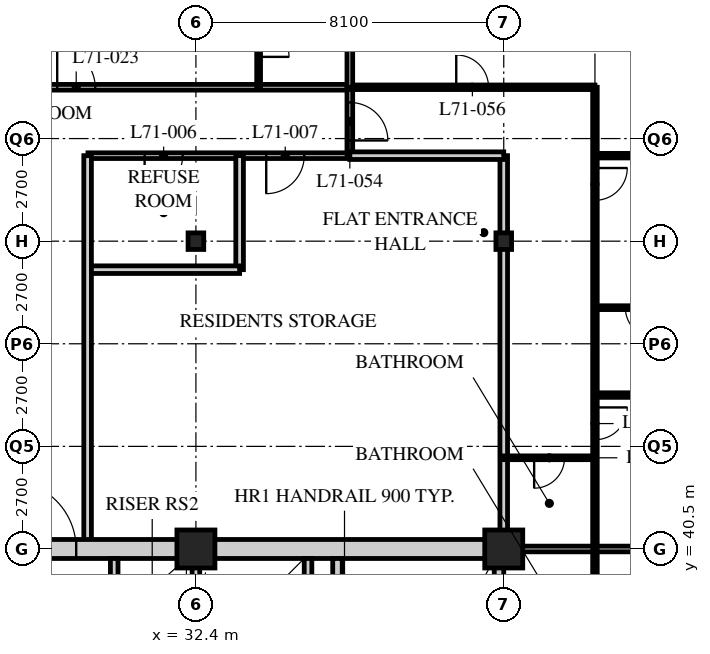
"""IFC4 building model, lengths in metres.
Left out: names, types, materials, properties, quantities, classifications, styles, units other than length and angle.
Written with IfcOpenShell. Run it as: python <this file> out.ifc"""

import sys

from ifc_helpers import new_model, si_unit, direction, frame, frame_2d, origin, origin_2d, place, context, subcontext, project, spatial, rectangle, hollow_rectangle, i_section, extrude, element, fill, save


model = new_model("IFC4")
c1 = context("Model", 3, precision=1e-05, world=origin(), true_north=direction((0.0, 1.0)))
c2 = subcontext(c1, "Body", "Model", "MODEL_VIEW")
j1 = project(units=[si_unit("LENGTHUNIT", "METRE"), si_unit("PLANEANGLEUNIT", "RADIAN")], contexts=[c1])
p1 = place(None, origin())
s1 = spatial("IfcSite", under=j1, at=p1, CompositionType="ELEMENT")
p2 = place(p1, origin())
s2 = spatial("IfcBuilding", under=s1, at=p2, CompositionType="ELEMENT")
p3 = place(p2, frame((0.0, 0.0, 277.5)))
s3 = spatial("IfcBuildingStorey", under=s2, at=p3, CompositionType="ELEMENT", Elevation=277.5)
p4 = place(p3, frame((32.4, 40.5, 0.0), z_axis=(0.0, 0.0, 1.0), x_axis=(1.0, 0.0, 0.0)))
e1 = element("IfcColumn", 1, at=p4, inside=s3, PredefinedType="COLUMN", context=c2, shape_type="SweptSolid", body=[
    extrude(hollow_rectangle(XDim=1.0, YDim=1.0, WallThickness=0.1, at=origin_2d()), origin(), (0.0, 0.0, 1.0), 3.9),
])
p5 = place(p3, frame((32.4, 48.6, 0.0), z_axis=(0.0, 0.0, 1.0), x_axis=(1.0, 0.0, 0.0)))
e2 = element("IfcColumn", 2, at=p5, inside=s3, PredefinedType="COLUMN", context=c2, shape_type="SweptSolid", body=[
    extrude(i_section(OverallWidth=0.412, OverallDepth=0.437, WebThickness=0.036, FlangeThickness=0.058, FilletRadius=0.015, at=origin_2d()), origin(), (0.0, 0.0, 1.0), 3.9),
])
p6 = place(p3, frame((40.5, 40.5, 0.0), z_axis=(0.0, 0.0, 1.0), x_axis=(1.0, 0.0, 0.0)))
e3 = element("IfcColumn", 3, at=p6, inside=s3, PredefinedType="COLUMN", context=c2, shape_type="SweptSolid", body=[
    extrude(hollow_rectangle(XDim=1.0, YDim=1.0, WallThickness=0.1, at=origin_2d()), origin(), (0.0, 0.0, 1.0), 3.9),
])
p7 = place(p3, frame((40.5, 48.6, 0.0), z_axis=(0.0, 0.0, 1.0), x_axis=(1.0, 0.0, 0.0)))
e4 = element("IfcColumn", 4, at=p7, inside=s3, PredefinedType="COLUMN", context=c2, shape_type="SweptSolid", body=[
    extrude(i_section(OverallWidth=0.412, OverallDepth=0.437, WebThickness=0.036, FlangeThickness=0.058, FilletRadius=0.015, at=origin_2d()), origin(), (0.0, 0.0, 1.0), 3.9),
])
p8 = place(p3, frame((12.15, 52.65, 0.0), z_axis=(0.0, 0.0, 1.0), x_axis=(1.0, 0.0, 0.0)))
e5 = element("IfcWall", 5, at=p8, inside=s3, PredefinedType="PARTITIONING", context=c2, shape_type="SweptSolid", body=[
    extrude(rectangle(XDim=24.3, YDim=0.15, at=frame_2d((12.15, 0.0))), origin(), (0.0, 0.0, 1.0), 3.69),
])
p9 = place(p8, frame((6.4, 0.0, 0.0)))
e6 = element("IfcOpeningElement", 6, at=p9, cuts=e5, PredefinedType="OPENING", context=c2, shape_type="SweptSolid", body=[
    extrude(rectangle(XDim=1.0, YDim=2.1, at=frame_2d((0.5, 1.05))), frame((0.0, 0.085, 0.0), z_axis=(0.0, -1.0, 0.0), x_axis=(1.0, 0.0, 0.0)), (0.0, 0.0, 1.0), 0.17),
])
p10 = place(p8, frame((8.5, 0.0, 0.0)))
e7 = element("IfcOpeningElement", 7, at=p10, cuts=e5, PredefinedType="OPENING", context=c2, shape_type="SweptSolid", body=[
    extrude(rectangle(XDim=1.0, YDim=2.1, at=frame_2d((0.5, 1.05))), frame((0.0, 0.085, 0.0), z_axis=(0.0, -1.0, 0.0), x_axis=(1.0, 0.0, 0.0)), (0.0, 0.0, 1.0), 0.17),
])
p11 = place(p8, frame((16.6, 0.0, 0.0)))
e8 = element("IfcOpeningElement", 8, at=p11, cuts=e5, PredefinedType="OPENING", context=c2, shape_type="SweptSolid", body=[
    extrude(rectangle(XDim=1.0, YDim=2.1, at=frame_2d((0.5, 1.05))), frame((0.0, 0.085, 0.0), z_axis=(0.0, -1.0, 0.0), x_axis=(1.0, 0.0, 0.0)), (0.0, 0.0, 1.0), 0.17),
])
p12 = place(p8, frame((1.525, 0.0, 0.0)))
e9 = element("IfcOpeningElement", 9, at=p12, cuts=e5, PredefinedType="OPENING", context=c2, shape_type="SweptSolid", body=[
    extrude(rectangle(XDim=1.0, YDim=2.1, at=frame_2d((0.5, 1.05))), frame((0.0, 0.085, 0.0), z_axis=(0.0, -1.0, 0.0), x_axis=(1.0, 0.0, 0.0)), (0.0, 0.0, 1.0), 0.17),
])
p13 = place(p3, frame((29.56, 50.85, 0.0), z_axis=(0.0, 0.0, 1.0), x_axis=(1.0, 0.0, 0.0)))
e10 = element("IfcWall", 10, at=p13, inside=s3, PredefinedType="PARTITIONING", context=c2, shape_type="SweptSolid", body=[
    extrude(rectangle(XDim=6.89, YDim=0.15, at=frame_2d((3.445, 0.0))), origin(), (0.0, 0.0, 1.0), 3.69),
])
p14 = place(p13, frame((1.49, 0.0, 0.0)))
e11 = element("IfcOpeningElement", 11, at=p14, cuts=e10, PredefinedType="OPENING", context=c2, shape_type="SweptSolid", body=[
    extrude(rectangle(XDim=1.0, YDim=2.1, at=frame_2d((0.5, 1.05))), frame((0.0, 0.085, 0.0), z_axis=(0.0, -1.0, 0.0), x_axis=(1.0, 0.0, 0.0)), (0.0, 0.0, 1.0), 0.17),
])
p15 = place(p13, frame((4.69, 0.0, 0.0)))
e12 = element("IfcOpeningElement", 12, at=p15, cuts=e10, PredefinedType="OPENING", context=c2, shape_type="SweptSolid", body=[
    extrude(rectangle(XDim=1.0, YDim=2.1, at=frame_2d((0.5, 1.05))), frame((0.0, 0.085, 0.0), z_axis=(0.0, -1.0, 0.0), x_axis=(1.0, 0.0, 0.0)), (0.0, 0.0, 1.0), 0.17),
])
p16 = place(p3, frame((33.55, 50.85, 0.0), z_axis=(0.0, 0.0, 1.0), x_axis=(0.0, -1.0, 0.0)))
e13 = element("IfcWall", 13, at=p16, inside=s3, PredefinedType="SOLIDWALL", context=c2, shape_type="SweptSolid", body=[
    extrude(rectangle(XDim=3.0, YDim=0.2, at=frame_2d((1.5, 0.0))), origin(), (0.0, 0.0, 1.0), 3.69),
])
p17 = place(p3, frame((29.55, 47.85, 0.0), z_axis=(0.0, 0.0, 1.0), x_axis=(1.0, 0.0, 0.0)))
e14 = element("IfcWall", 14, at=p17, inside=s3, PredefinedType="SOLIDWALL", context=c2, shape_type="SweptSolid", body=[
    extrude(rectangle(XDim=4.0, YDim=0.2, at=frame_2d((2.0, 0.0))), origin(), (0.0, 0.0, 1.0), 3.69),
])
p18 = place(p3, frame((29.55, 40.5, 0.0), z_axis=(0.0, 0.0, 1.0), x_axis=(0.0, 1.0, 0.0)))
e15 = element("IfcWall", 15, at=p18, inside=s3, PredefinedType="SOLIDWALL", context=c2, shape_type="SweptSolid", body=[
    extrude(rectangle(XDim=10.35, YDim=0.2, at=frame_2d((5.175, 0.0))), origin(), (0.0, 0.0, 1.0), 3.69),
])
p19 = place(p3, frame((36.45, 50.85, 0.0), z_axis=(0.0, 0.0, 1.0), x_axis=(0.0, 1.0, 0.0)))
e16 = element("IfcWall", 16, at=p19, inside=s3, PredefinedType="PARTITIONING", context=c2, shape_type="SweptSolid", body=[
    extrude(rectangle(XDim=1.8, YDim=0.15, at=frame_2d((0.9, 0.0))), origin(), (0.0, 0.0, 1.0), 3.69),
])
p20 = place(p19, frame((0.4, 0.0, 0.0)))
e17 = element("IfcOpeningElement", 17, at=p20, cuts=e16, PredefinedType="OPENING", context=c2, shape_type="SweptSolid", body=[
    extrude(rectangle(XDim=1.0, YDim=2.1, at=frame_2d((0.5, 1.05))), frame((0.0, 0.085, 0.0), z_axis=(0.0, -1.0, 0.0), x_axis=(1.0, 0.0, 0.0)), (0.0, 0.0, 1.0), 0.17),
])
p21 = place(p3, frame((40.5, 40.5, 0.0), z_axis=(0.0, 0.0, 1.0), x_axis=(0.0, 1.0, 0.0)))
e18 = element("IfcWall", 18, at=p21, inside=s3, PredefinedType="SOLIDWALL", context=c2, shape_type="SweptSolid", body=[
    extrude(rectangle(XDim=10.35, YDim=0.2, at=frame_2d((5.175, 0.0))), origin(), (0.0, 0.0, 1.0), 3.078),
])
p22 = place(p3, frame((34.05, 52.65, 0.0), z_axis=(0.0, 0.0, 1.0), x_axis=(0.0, 1.0, 0.0)))
e19 = element("IfcWall", 19, at=p22, inside=s3, PredefinedType="PARTITIONING", context=c2, shape_type="SweptSolid", body=[
    extrude(rectangle(XDim=2.4, YDim=0.1, at=frame_2d((1.2, 0.0))), origin(), (0.0, 0.0, 1.0), 3.69),
])
p23 = place(p22, frame((0.8, 0.0, 0.0)))
e20 = element("IfcOpeningElement", 20, at=p23, cuts=e19, PredefinedType="OPENING", context=c2, shape_type="SweptSolid", body=[
    extrude(rectangle(XDim=0.8, YDim=2.1, at=frame_2d((0.4, 1.05))), frame((0.0, 0.06, 0.0), z_axis=(0.0, -1.0, 0.0), x_axis=(1.0, 0.0, 0.0)), (0.0, 0.0, 1.0), 0.12),
])
p24 = place(p3, frame((42.9, 22.5, 0.0), z_axis=(0.0, 0.0, 1.0), x_axis=(0.0, 1.0, 0.0)))
e21 = element("IfcWall", 21, at=p24, inside=s3, PredefinedType="PARTITIONING", context=c2, shape_type="SweptSolid", body=[
    extrude(rectangle(XDim=18.0, YDim=0.12, at=frame_2d((9.0, 0.0))), origin(), (0.0, 0.0, 1.0), 3.69),
])
p25 = place(p24, frame((2.125, 0.0, 0.0)))
e22 = element("IfcOpeningElement", 22, at=p25, cuts=e21, PredefinedType="OPENING", context=c2, shape_type="SweptSolid", body=[
    extrude(rectangle(XDim=0.85, YDim=2.1, at=frame_2d((0.425, 1.05))), frame((0.0, 0.07, 0.0), z_axis=(0.0, -1.0, 0.0), x_axis=(1.0, 0.0, 0.0)), (0.0, 0.0, 1.0), 0.14),
])
p26 = place(p24, frame((6.175, 0.0, 0.0)))
e23 = element("IfcOpeningElement", 23, at=p26, cuts=e21, PredefinedType="OPENING", context=c2, shape_type="SweptSolid", body=[
    extrude(rectangle(XDim=0.85, YDim=2.1, at=frame_2d((0.425, 1.05))), frame((0.0, 0.07, 0.0), z_axis=(0.0, -1.0, 0.0), x_axis=(1.0, 0.0, 0.0)), (0.0, 0.0, 1.0), 0.14),
])
p27 = place(p24, frame((10.225, 0.0, 0.0)))
e24 = element("IfcOpeningElement", 24, at=p27, cuts=e21, PredefinedType="OPENING", context=c2, shape_type="SweptSolid", body=[
    extrude(rectangle(XDim=0.85, YDim=2.1, at=frame_2d((0.425, 1.05))), frame((0.0, 0.07, 0.0), z_axis=(0.0, -1.0, 0.0), x_axis=(1.0, 0.0, 0.0)), (0.0, 0.0, 1.0), 0.14),
])
p28 = place(p24, frame((14.275, 0.0, 0.0)))
e25 = element("IfcOpeningElement", 25, at=p28, cuts=e21, PredefinedType="OPENING", context=c2, shape_type="SweptSolid", body=[
    extrude(rectangle(XDim=0.85, YDim=2.1, at=frame_2d((0.425, 1.05))), frame((0.0, 0.07, 0.0), z_axis=(0.0, -1.0, 0.0), x_axis=(1.0, 0.0, 0.0)), (0.0, 0.0, 1.0), 0.14),
])
p29 = place(p3, frame((40.5, 40.5, 0.0), z_axis=(0.0, 0.0, 1.0), x_axis=(1.0, 0.0, 0.0)))
e26 = element("IfcWall", 26, at=p29, inside=s3, PredefinedType="PARTITIONING", context=c2, shape_type="SweptSolid", body=[
    extrude(rectangle(XDim=15.9, YDim=0.15, at=frame_2d((7.95, 0.0))), origin(), (0.0, 0.0, 1.0), 3.078),
])
p30 = place(p3, frame((40.5, 42.9, 0.0), z_axis=(0.0, 0.0, 1.0), x_axis=(1.0, 0.0, 0.0)))
e27 = element("IfcWall", 27, at=p30, inside=s3, PredefinedType="PARTITIONING", context=c2, shape_type="SweptSolid", body=[
    extrude(rectangle(XDim=2.4, YDim=0.1, at=frame_2d((1.2, 0.0))), origin(), (0.0, 0.0, 1.0), 3.69),
])
p31 = place(p30, frame((0.8, 0.0, 0.0)))
e28 = element("IfcOpeningElement", 28, at=p31, cuts=e27, PredefinedType="OPENING", context=c2, shape_type="SweptSolid", body=[
    extrude(rectangle(XDim=0.8, YDim=2.1, at=frame_2d((0.4, 1.05))), frame((0.0, 0.06, 0.0), z_axis=(0.0, -1.0, 0.0), x_axis=(1.0, 0.0, 0.0)), (0.0, 0.0, 1.0), 0.12),
])
p32 = place(p3, frame((42.9, 52.65, 0.0), z_axis=(0.0, 0.0, 1.0), x_axis=(0.0, -1.0, 0.0)))
e29 = element("IfcWall", 29, at=p32, inside=s3, PredefinedType="PARTITIONING", context=c2, shape_type="SweptSolid", body=[
    extrude(rectangle(XDim=12.15, YDim=0.12, at=frame_2d((6.075, 0.0))), origin(), (0.0, 0.0, 1.0), 3.69),
])
p33 = place(p32, frame((2.125, 0.0, 0.0)))
e30 = element("IfcOpeningElement", 30, at=p33, cuts=e29, PredefinedType="OPENING", context=c2, shape_type="SweptSolid", body=[
    extrude(rectangle(XDim=0.85, YDim=2.1, at=frame_2d((0.425, 1.05))), frame((0.0, 0.07, 0.0), z_axis=(0.0, -1.0, 0.0), x_axis=(1.0, 0.0, 0.0)), (0.0, 0.0, 1.0), 0.14),
])
p34 = place(p32, frame((8.425, 0.0, 0.0)))
e31 = element("IfcOpeningElement", 31, at=p34, cuts=e29, PredefinedType="OPENING", context=c2, shape_type="SweptSolid", body=[
    extrude(rectangle(XDim=0.85, YDim=2.1, at=frame_2d((0.425, 1.05))), frame((0.0, 0.07, 0.0), z_axis=(0.0, -1.0, 0.0), x_axis=(1.0, 0.0, 0.0)), (0.0, 0.0, 1.0), 0.14),
])
p35 = place(p3, frame((36.45, 52.65, 0.0), z_axis=(0.0, 0.0, 1.0), x_axis=(1.0, 0.0, 0.0)))
e32 = element("IfcWall", 32, at=p35, inside=s3, PredefinedType="PARTITIONING", context=c2, shape_type="SweptSolid", body=[
    extrude(rectangle(XDim=6.45, YDim=0.12, at=frame_2d((3.225, 0.0))), origin(), (0.0, 0.0, 1.0), 3.69),
])
p36 = place(p35, frame((2.8, 0.0, 0.0)))
e33 = element("IfcOpeningElement", 33, at=p36, cuts=e32, PredefinedType="OPENING", context=c2, shape_type="SweptSolid", body=[
    extrude(rectangle(XDim=0.85, YDim=2.1, at=frame_2d((0.425, 1.05))), frame((0.0, 0.07, 0.0), z_axis=(0.0, -1.0, 0.0), x_axis=(1.0, 0.0, 0.0)), (0.0, 0.0, 1.0), 0.14),
])
p37 = place(p3, frame((36.45, 50.85, 0.0), z_axis=(0.0, 0.0, 1.0), x_axis=(1.0, 0.0, 0.0)))
e34 = element("IfcWall", 34, at=p37, inside=s3, PredefinedType="SOLIDWALL", context=c2, shape_type="SweptSolid", body=[
    extrude(rectangle(XDim=4.05, YDim=0.2, at=frame_2d((2.025, 0.0))), origin(), (0.0, 0.0, 1.0), 3.69),
])
p38 = place(p3, frame((42.9, 50.85, 0.0), z_axis=(0.0, 0.0, 1.0), x_axis=(1.0, 0.0, 0.0)))
e35 = element("IfcWall", 35, at=p38, inside=s3, PredefinedType="PARTITIONING", context=c2, shape_type="SweptSolid", body=[
    extrude(rectangle(XDim=13.5, YDim=0.12, at=frame_2d((6.75, 0.0))), origin(), (0.0, 0.0, 1.0), 3.69),
])
p39 = place(p3, frame((36.45, 64.5, 0.0), z_axis=(0.0, 0.0, 1.0), x_axis=(0.0, -1.0, 0.0)))
e36 = element("IfcWall", 36, at=p39, inside=s3, PredefinedType="PARTITIONING", context=c2, shape_type="SweptSolid", body=[
    extrude(rectangle(XDim=11.85, YDim=0.15, at=frame_2d((5.925, 0.0))), origin(), (0.0, 0.0, 1.0), 3.69),
])
p40 = place(p3, frame((42.9, 46.85, 0.0), z_axis=(0.0, 0.0, 1.0), x_axis=(1.0, 0.0, 0.0)))
e37 = element("IfcWall", 37, at=p40, inside=s3, PredefinedType="PARTITIONING", context=c2, shape_type="SweptSolid", body=[
    extrude(rectangle(XDim=2.4, YDim=0.1, at=frame_2d((1.2, 0.0))), origin(), (0.0, 0.0, 1.0), 3.69),
])
p41 = place(p40, frame((0.8, 0.0, 0.0)))
e38 = element("IfcOpeningElement", 38, at=p41, cuts=e37, PredefinedType="OPENING", context=c2, shape_type="SweptSolid", body=[
    extrude(rectangle(XDim=0.8, YDim=2.1, at=frame_2d((0.4, 1.05))), frame((0.0, 0.06, 0.0), z_axis=(0.0, -1.0, 0.0), x_axis=(1.0, 0.0, 0.0)), (0.0, 0.0, 1.0), 0.12),
])
p42 = place(p3, frame((42.9, 44.55, 0.0), z_axis=(0.0, 0.0, 1.0), x_axis=(1.0, 0.0, 0.0)))
e39 = element("IfcWall", 39, at=p42, inside=s3, PredefinedType="PARTITIONING", context=c2, shape_type="SweptSolid", body=[
    extrude(rectangle(XDim=13.5, YDim=0.12, at=frame_2d((6.75, 0.0))), origin(), (0.0, 0.0, 1.0), 3.69),
])
p43 = place(p3, frame((15.95, 40.5, 0.0), z_axis=(0.0, 0.0, 1.0), x_axis=(1.0, 0.0, 0.0)))
e40 = element("IfcWall", 40, at=p43, inside=s3, PredefinedType="SOLIDWALL", context=c2, shape_type="SweptSolid", body=[
    extrude(rectangle(XDim=24.55, YDim=0.5, at=frame_2d((12.275, 0.0))), origin(), (0.0, 0.0, 1.0), 3.04),
])
p44 = place(p43, frame((11.5, 0.0, 0.0)))
e41 = element("IfcOpeningElement", 41, at=p44, cuts=e40, PredefinedType="OPENING", context=c2, shape_type="SweptSolid", body=[
    extrude(rectangle(XDim=1.8, YDim=2.4, at=frame_2d((0.9, 1.2))), frame((0.0, 0.26, 0.0), z_axis=(0.0, -1.0, 0.0), x_axis=(1.0, 0.0, 0.0)), (0.0, 0.0, 1.0), 0.52),
])
p45 = place(p3, frame((40.375, 24.55, 0.0), z_axis=(0.0, 0.0, 1.0), x_axis=(0.0, 1.0, 0.0)))
e42 = element("IfcWall", 42, at=p45, inside=s3, PredefinedType="SOLIDWALL", context=c2, shape_type="SweptSolid", body=[
    extrude(rectangle(XDim=15.7, YDim=0.25, at=frame_2d((7.85, 0.0))), origin(), (0.0, 0.0, 1.0), 3.078),
])
p46 = place(p3, frame((32.4, 32.5, 0.0), z_axis=(0.0, 0.0, 1.0), x_axis=(0.0, 1.0, 0.0)))
e43 = element("IfcWall", 43, at=p46, inside=s3, PredefinedType="SOLIDWALL", context=c2, shape_type="SweptSolid", body=[
    extrude(rectangle(XDim=7.75, YDim=0.2, at=frame_2d((3.875, 0.0))), origin(), (0.0, 0.0, 1.0), 3.078),
])
p47 = place(p46, frame((1.9, 0.0, 0.0)))
e44 = element("IfcOpeningElement", 44, at=p47, cuts=e43, PredefinedType="OPENING", context=c2, shape_type="SweptSolid", body=[
    extrude(rectangle(XDim=1.2, YDim=2.1, at=frame_2d((0.6, 1.05))), frame((0.0, 0.11, 0.0), z_axis=(0.0, -1.0, 0.0), x_axis=(1.0, 0.0, 0.0)), (0.0, 0.0, 1.0), 0.22),
])
p48 = place(p3, frame((36.125, 32.5, 0.0), z_axis=(0.0, 0.0, 1.0), x_axis=(0.0, 1.0, 0.0)))
e45 = element("IfcWall", 45, at=p48, inside=s3, PredefinedType="SOLIDWALL", context=c2, shape_type="SweptSolid", body=[
    extrude(rectangle(XDim=7.75, YDim=0.25, at=frame_2d((3.875, 0.0))), origin(), (0.0, 0.0, 1.0), 3.69),
])
p49 = place(p48, frame((0.45, 0.0, 0.0)))
e46 = element("IfcOpeningElement", 46, at=p49, cuts=e45, PredefinedType="OPENING", context=c2, shape_type="SweptSolid", body=[
    extrude(rectangle(XDim=1.2, YDim=2.1, at=frame_2d((0.6, 1.05))), frame((0.0, 0.135, 0.0), z_axis=(0.0, -1.0, 0.0), x_axis=(1.0, 0.0, 0.0)), (0.0, 0.0, 1.0), 0.27),
])
p50 = place(p3, frame((35.35, 37.65, 0.0), z_axis=(0.0, 0.0, 1.0), x_axis=(0.0, 1.0, 0.0)))
e47 = element("IfcWall", 47, at=p50, inside=s3, PredefinedType="SOLIDWALL", context=c2, shape_type="SweptSolid", body=[
    extrude(rectangle(XDim=2.6, YDim=0.2, at=frame_2d((1.3, 0.0))), origin(), (0.0, 0.0, 1.0), 3.69),
])
p51 = place(p3, frame((30.25, 38.65, 0.0), z_axis=(0.0, 0.0, 1.0), x_axis=(0.0, 1.0, 0.0)))
e48 = element("IfcWall", 48, at=p51, inside=s3, PredefinedType="SOLIDWALL", context=c2, shape_type="SweptSolid", body=[
    extrude(rectangle(XDim=1.6, YDim=0.2, at=frame_2d((0.8, 0.0))), origin(), (0.0, 0.0, 1.0), 3.69),
])
p52 = place(p14, origin())
e49 = element("IfcDoor", 49, at=p52, inside=s3, OperationType="SINGLE_SWING_RIGHT", PredefinedType="DOOR", context=c2, shape_type="SweptSolid", body=[
    extrude(rectangle(XDim=1.0, YDim=2.1, at=frame_2d((0.5, 1.05))), frame((0.0, 0.025, 0.0), z_axis=(0.0, -1.0, 0.0), x_axis=(1.0, 0.0, 0.0)), (0.0, 0.0, 1.0), 0.05),
])
fill(e11, e49)
p53 = place(p15, origin())
e50 = element("IfcDoor", 50, at=p53, inside=s3, OperationType="SINGLE_SWING_RIGHT", PredefinedType="DOOR", context=c2, shape_type="SweptSolid", body=[
    extrude(rectangle(XDim=1.0, YDim=2.1, at=frame_2d((0.5, 1.05))), frame((0.0, 0.025, 0.0), z_axis=(0.0, -1.0, 0.0), x_axis=(1.0, 0.0, 0.0)), (0.0, 0.0, 1.0), 0.05),
])
fill(e12, e50)
p54 = place(p23, origin())
e51 = element("IfcDoor", 51, at=p54, inside=s3, OperationType="SINGLE_SWING_RIGHT", PredefinedType="DOOR", context=c2, shape_type="SweptSolid", body=[
    extrude(rectangle(XDim=0.8, YDim=2.1, at=frame_2d((0.4, 1.05))), frame((0.0, 0.025, 0.0), z_axis=(0.0, -1.0, 0.0), x_axis=(1.0, 0.0, 0.0)), (0.0, 0.0, 1.0), 0.05),
])
fill(e20, e51)
p55 = place(p11, origin())
e52 = element("IfcDoor", 52, at=p55, inside=s3, OperationType="SINGLE_SWING_LEFT", PredefinedType="DOOR", context=c2, shape_type="SweptSolid", body=[
    extrude(rectangle(XDim=1.0, YDim=2.1, at=frame_2d((0.5, 1.05))), frame((0.0, 0.025, 0.0), z_axis=(0.0, -1.0, 0.0), x_axis=(1.0, 0.0, 0.0)), (0.0, 0.0, 1.0), 0.05),
])
fill(e8, e52)
p56 = place(p20, origin())
e53 = element("IfcDoor", 53, at=p56, inside=s3, OperationType="SINGLE_SWING_RIGHT", PredefinedType="DOOR", context=c2, shape_type="SweptSolid", body=[
    extrude(rectangle(XDim=1.0, YDim=2.1, at=frame_2d((0.5, 1.05))), frame((0.0, 0.025, 0.0), z_axis=(0.0, -1.0, 0.0), x_axis=(1.0, 0.0, 0.0)), (0.0, 0.0, 1.0), 0.05),
])
fill(e17, e53)
p57 = place(p31, origin())
e54 = element("IfcDoor", 54, at=p57, inside=s3, OperationType="SINGLE_SWING_RIGHT", PredefinedType="DOOR", context=c2, shape_type="SweptSolid", body=[
    extrude(rectangle(XDim=0.8, YDim=2.1, at=frame_2d((0.4, 1.05))), frame((0.0, 0.025, 0.0), z_axis=(0.0, -1.0, 0.0), x_axis=(1.0, 0.0, 0.0)), (0.0, 0.0, 1.0), 0.05),
])
fill(e28, e54)
p58 = place(p36, origin())
e55 = element("IfcDoor", 55, at=p58, inside=s3, OperationType="SINGLE_SWING_LEFT", PredefinedType="DOOR", context=c2, shape_type="SweptSolid", body=[
    extrude(rectangle(XDim=0.85, YDim=2.1, at=frame_2d((0.425, 1.05))), frame((0.0, 0.025, 0.0), z_axis=(0.0, -1.0, 0.0), x_axis=(1.0, 0.0, 0.0)), (0.0, 0.0, 1.0), 0.05),
])
fill(e33, e55)
p59 = place(p41, origin())
e56 = element("IfcDoor", 56, at=p59, inside=s3, OperationType="SINGLE_SWING_LEFT", PredefinedType="DOOR", context=c2, shape_type="SweptSolid", body=[
    extrude(rectangle(XDim=0.8, YDim=2.1, at=frame_2d((0.4, 1.05))), frame((0.0, 0.025, 0.0), z_axis=(0.0, -1.0, 0.0), x_axis=(1.0, 0.0, 0.0)), (0.0, 0.0, 1.0), 0.05),
])
fill(e38, e56)
p60 = place(p33, origin())
e57 = element("IfcDoor", 57, at=p60, inside=s3, OperationType="SINGLE_SWING_LEFT", PredefinedType="DOOR", context=c2, shape_type="SweptSolid", body=[
    extrude(rectangle(XDim=0.85, YDim=2.1, at=frame_2d((0.425, 1.05))), frame((0.0, 0.025, 0.0), z_axis=(0.0, -1.0, 0.0), x_axis=(1.0, 0.0, 0.0)), (0.0, 0.0, 1.0), 0.05),
])
fill(e30, e57)
p61 = place(p34, origin())
e58 = element("IfcDoor", 58, at=p61, inside=s3, OperationType="SINGLE_SWING_LEFT", PredefinedType="DOOR", context=c2, shape_type="SweptSolid", body=[
    extrude(rectangle(XDim=0.85, YDim=2.1, at=frame_2d((0.425, 1.05))), frame((0.0, 0.025, 0.0), z_axis=(0.0, -1.0, 0.0), x_axis=(1.0, 0.0, 0.0)), (0.0, 0.0, 1.0), 0.05),
])
fill(e31, e58)
p62 = place(p44, origin())
e59 = element("IfcDoor", 59, at=p62, inside=s3, OperationType="DOUBLE_DOOR_SINGLE_SWING", PredefinedType="DOOR", context=c2, shape_type="SweptSolid", body=[
    extrude(rectangle(XDim=1.8, YDim=2.4, at=frame_2d((0.9, 1.2))), frame((0.0, 0.025, 0.0), z_axis=(0.0, -1.0, 0.0), x_axis=(1.0, 0.0, 0.0)), (0.0, 0.0, 1.0), 0.05),
])
fill(e41, e59)
save(model, sys.argv[1])
